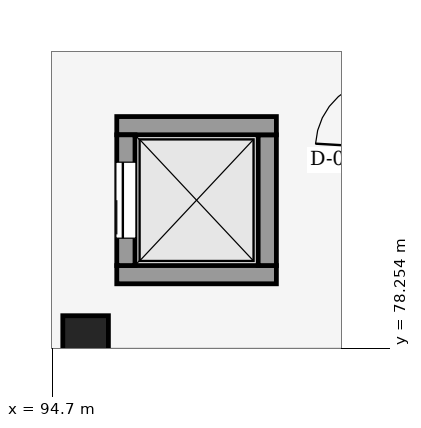
"""IFC4 building model, lengths in metres.
Left out: names, types, materials, properties, quantities, classifications, styles, units other than length and angle.
Written with IfcOpenShell. Run it as: python <this file> out.ifc"""

import sys

from ifc_helpers import new_model, si_unit, direction, frame, frame_2d, origin, origin_2d, place, context, subcontext, project, spatial, rectangle, extrude, element, fill, save


model = new_model("IFC4")
c1 = context("Model", 3, precision=1e-05, world=origin(), true_north=direction((0.0, 1.0)))
c2 = subcontext(c1, "Body", "Model", "MODEL_VIEW")
j1 = project(units=[si_unit("LENGTHUNIT", "METRE"), si_unit("PLANEANGLEUNIT", "RADIAN")], contexts=[c1])
p1 = place(None, origin())
s1 = spatial("IfcSite", under=j1, at=p1, CompositionType="ELEMENT")
p2 = place(p1, origin())
s2 = spatial("IfcBuilding", under=s1, at=p2, CompositionType="ELEMENT")
p3 = place(p2, frame((0.0, 0.0, 21.3)))
s3 = spatial("IfcBuildingStorey", under=s2, at=p3, CompositionType="ELEMENT", Elevation=21.3)
p4 = place(p3, frame((95.14, 78.38, 0.0), z_axis=(0.0, 0.0, 1.0), x_axis=(1.0, 0.0, 0.0)))
e1 = element("IfcColumn", 1, at=p4, inside=s3, PredefinedType="COLUMN", context=c2, shape_type="SweptSolid", body=[
    extrude(rectangle(XDim=0.6, YDim=0.6, at=origin_2d()), origin(), (0.0, 0.0, 1.0), 4.05),
])
p5 = place(p3, frame((97.65, 79.22, 0.0), z_axis=(0.0, 0.0, 1.0), x_axis=(-1.0, 0.0, 0.0)))
e2 = element("IfcWall", 2, at=p5, inside=s3, PredefinedType="SHEAR", context=c2, shape_type="SweptSolid", body=[
    extrude(rectangle(XDim=2.1, YDim=0.24, at=frame_2d((1.05, 0.0))), origin(), (0.0, 0.0, 1.0), 4.05),
])
p6 = place(p3, frame((97.53, 81.06, 0.0), z_axis=(0.0, 0.0, 1.0), x_axis=(0.0, -1.0, 0.0)))
e3 = element("IfcWall", 3, at=p6, inside=s3, PredefinedType="SHEAR", context=c2, shape_type="SweptSolid", body=[
    extrude(rectangle(XDim=1.72, YDim=0.24, at=frame_2d((0.86, 0.0))), origin(), (0.0, 0.0, 1.0), 4.05),
])
p7 = place(p3, frame((95.55, 81.18, 0.0), z_axis=(0.0, 0.0, 1.0), x_axis=(1.0, 0.0, 0.0)))
e4 = element("IfcWall", 4, at=p7, inside=s3, PredefinedType="SHEAR", context=c2, shape_type="SweptSolid", body=[
    extrude(rectangle(XDim=2.1, YDim=0.24, at=frame_2d((1.05, 0.0))), origin(), (0.0, 0.0, 1.0), 4.05),
])
p8 = place(p3, frame((95.67, 79.34, 0.0), z_axis=(0.0, 0.0, 1.0), x_axis=(0.0, 1.0, 0.0)))
e5 = element("IfcWall", 5, at=p8, inside=s3, PredefinedType="SHEAR", context=c2, shape_type="SweptSolid", body=[
    extrude(rectangle(XDim=1.72, YDim=0.24, at=frame_2d((0.86, 0.0))), origin(), (0.0, 0.0, 1.0), 4.05),
])
p9 = place(p8, frame((0.36, 0.0, 0.0)))
e6 = element("IfcOpeningElement", 6, at=p9, cuts=e5, PredefinedType="OPENING", context=c2, shape_type="SweptSolid", body=[
    extrude(rectangle(XDim=1.0, YDim=2.15, at=frame_2d((0.5, 1.075))), frame((0.0, 0.13, 0.0), z_axis=(0.0, -1.0, 0.0), x_axis=(1.0, 0.0, 0.0)), (0.0, 0.0, 1.0), 0.26),
])
p10 = place(p9, origin())
e7 = element("IfcDoor", 7, at=p10, inside=s3, OperationType="SLIDING_TO_LEFT", PredefinedType="DOOR", context=c2, shape_type="SweptSolid", body=[
    extrude(rectangle(XDim=1.0, YDim=2.15, at=frame_2d((0.5, 1.075))), frame((0.0, 0.025, 0.0), z_axis=(0.0, -1.0, 0.0), x_axis=(1.0, 0.0, 0.0)), (0.0, 0.0, 1.0), 0.05),
])
fill(e6, e7)
save(model, sys.argv[1])
